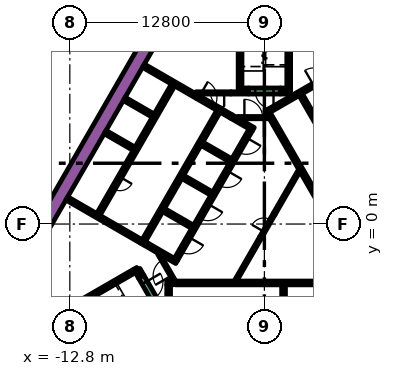
"""IFC4 building model, lengths in metres.
Left out: names, types, materials, properties, quantities, classifications, styles, units other than length and angle.
Written with IfcOpenShell. Run it as: python <this file> out.ifc"""

import sys

from ifc_helpers import new_model, si_unit, direction, frame, frame_2d, origin, place, context, subcontext, project, spatial, polyline, rectangle, outline, extrude, element, fill, save


model = new_model("IFC4")
c1 = context("Model", 3, precision=1e-05, world=origin(), true_north=direction((0.0, 1.0)))
c2 = subcontext(c1, "Body", "Model", "MODEL_VIEW")
j1 = project(units=[si_unit("LENGTHUNIT", "METRE"), si_unit("PLANEANGLEUNIT", "RADIAN")], contexts=[c1])
p1 = place(None, origin())
s1 = spatial("IfcSite", under=j1, at=p1, CompositionType="ELEMENT")
p2 = place(p1, origin())
s2 = spatial("IfcBuilding", under=s1, at=p2, CompositionType="ELEMENT")
p3 = place(p2, frame((0.0, 0.0, 11.4)))
s3 = spatial("IfcBuildingStorey", under=s2, at=p3, CompositionType="ELEMENT", Elevation=11.4)
p4 = place(p3, frame((-15.36, -1.503, 0.0), z_axis=(0.0, 0.0, 1.0), x_axis=(0.50000389221, 0.866023156604, 0.0)))
e1 = element("IfcWall", 1, at=p4, inside=s3, PredefinedType="SOLIDWALL", context=c2, shape_type="SweptSolid", body=[
    extrude(rectangle(XDim=21.0, YDim=0.9, at=frame_2d((10.5, 0.0))), origin(), (0.0, 0.0, 1.0), 4.8),
])
p5 = place(p3, frame((-12.134, -11.883, 0.0), z_axis=(0.0, 0.0, 1.0), x_axis=(-0.500005339912, 0.866022320763, 0.0)))
e2 = element("IfcWall", 2, at=p5, inside=s3, PredefinedType="SOLIDWALL", context=c2, shape_type="SweptSolid", body=[
    extrude(rectangle(XDim=9.488, YDim=0.9, at=frame_2d((4.744, 0.0))), origin(), (0.0, 0.0, 1.0), 4.8),
])
p6 = place(p3, frame((1.6, 8.95, 0.0), z_axis=(0.0, 0.0, 1.0), x_axis=(0.0, 1.0, 0.0)))
e3 = element("IfcWall", 3, at=p6, inside=s3, PredefinedType="SOLIDWALL", context=c2, shape_type="SweptSolid", body=[
    extrude(rectangle(XDim=6.8, YDim=0.25, at=frame_2d((3.4, 0.0))), origin(), (0.0, 0.0, 1.0), 4.8),
])
p7 = place(p3, frame((1.05, 8.825, 0.0), z_axis=(0.0, 0.0, 1.0), x_axis=(1.0, 0.0, 0.0)))
e4 = element("IfcWall", 4, at=p7, inside=s3, PredefinedType="SOLIDWALL", context=c2, shape_type="SweptSolid", body=[
    extrude(rectangle(XDim=0.675, YDim=0.25, at=frame_2d((0.337, 0.0))), origin(), (0.0, 0.0, 1.0), 4.8),
])
p8 = place(p3, frame((-1.6, 8.7, 0.0), z_axis=(0.0, 0.0, 1.0), x_axis=(0.0, 1.0, 0.0)))
e5 = element("IfcWall", 5, at=p8, inside=s3, PredefinedType="SOLIDWALL", context=c2, shape_type="SweptSolid", body=[
    extrude(rectangle(XDim=7.05, YDim=0.25, at=frame_2d((3.525, 0.0))), origin(), (0.0, 0.0, 1.0), 4.8),
])
p9 = place(p3, frame((-1.475, 8.825, 0.0), z_axis=(0.0, 0.0, 1.0), x_axis=(1.0, 0.0, 0.0)))
e6 = element("IfcWall", 6, at=p9, inside=s3, PredefinedType="SOLIDWALL", context=c2, shape_type="SweptSolid", body=[
    extrude(rectangle(XDim=0.425, YDim=0.25, at=frame_2d((0.212, 0.0))), origin(), (0.0, 0.0, 1.0), 4.8),
])
p10 = place(p3, frame((-14.44, -6.49, 0.0), z_axis=(0.0, 0.0, 1.0), x_axis=(0.866022966069, 0.500004222222, 0.0)))
e7 = element("IfcWall", 7, at=p10, inside=s3, PredefinedType="SOLIDWALL", context=c2, shape_type="SweptSolid", body=[
    extrude(rectangle(XDim=6.8, YDim=0.25, at=frame_2d((3.4, 0.0))), origin(), (0.0, 0.0, 1.0), 4.8),
])
p11 = place(p3, frame((-8.168, -3.503, 0.0), z_axis=(0.0, 0.0, 1.0), x_axis=(-0.499952099219, 0.866053057547, 0.0)))
e8 = element("IfcWall", 8, at=p11, inside=s3, PredefinedType="SOLIDWALL", context=c2, shape_type="SweptSolid", body=[
    extrude(rectangle(XDim=0.675, YDim=0.25, at=frame_2d((0.337, 0.0))), origin(), (0.0, 0.0, 1.0), 4.8),
])
p12 = place(p3, frame((-5.845, -3.875, 0.0), z_axis=(0.0, 0.0, 1.0), x_axis=(1.0, 0.0, 0.0)))
e9 = element("IfcWall", 9, at=p12, inside=s3, PredefinedType="SOLIDWALL", context=c2, shape_type="SweptSolid", body=[
    extrude(rectangle(XDim=12.27, YDim=0.25, at=frame_2d((6.135, 0.0))), origin(), (0.0, 0.0, 1.0), 4.8),
])
p13 = place(p3, frame((-6.425, -3.875, 0.0), z_axis=(0.0, 0.0, 1.0), x_axis=(1.0, 0.0, 0.0)))
e10 = element("IfcWall", 10, at=p13, inside=s3, PredefinedType="SOLIDWALL", context=c2, shape_type="SweptSolid", body=[
    extrude(rectangle(XDim=0.428, YDim=0.25, at=frame_2d((0.214, 0.0))), origin(), (0.0, 0.0, 1.0), 4.8),
])
p14 = place(p3, frame((1.26, -4.0, 0.0), z_axis=(0.0, 0.0, 1.0), x_axis=(0.0, -1.0, 0.0)))
e11 = element("IfcWall", 11, at=p14, inside=s3, PredefinedType="SOLIDWALL", context=c2, shape_type="SweptSolid", body=[
    extrude(rectangle(XDim=2.2, YDim=0.25, at=frame_2d((1.1, 0.0))), origin(), (0.0, 0.0, 1.0), 4.8),
])
p15 = place(p3, frame((-6.3, -4.0, 0.0), z_axis=(0.0, 0.0, 1.0), x_axis=(0.0, -1.0, 0.0)))
e12 = element("IfcWall", 12, at=p15, inside=s3, PredefinedType="SOLIDWALL", context=c2, shape_type="SweptSolid", body=[
    extrude(rectangle(XDim=3.154, YDim=0.25, at=frame_2d((1.577, 0.0))), origin(), (0.0, 0.0, 1.0), 4.8),
])
p16 = place(p3, origin())
e13 = element("IfcWall", 13, at=p16, inside=s3, PredefinedType="SOLIDWALL", context=c2, shape_type="SweptSolid", body=[
    extrude(outline(polyline([(6.552, -3.348), (6.677, -3.564), (6.46, -3.689), (4.897, -0.981), (0.332, 6.925), (0.335, 6.925), (0.335, 6.925), (0.335, 6.925), (0.335, 7.075), (0.335, 7.075), (0.335, 7.075), (0.245, 7.075), (0.079, 7.363), (0.035, 7.439), (0.252, 7.564), (0.377, 7.348), (6.552, -3.348)])), origin(), (0.0, 0.0, 1.0), 4.8),
])
p17 = place(p3, frame((0.314, 7.456, 0.0), z_axis=(0.0, 0.0, 1.0), x_axis=(0.866013897511, 0.50001992892, 0.0)))
e14 = element("IfcWall", 14, at=p17, inside=s3, PredefinedType="SOLIDWALL", context=c2, shape_type="SweptSolid", body=[
    extrude(rectangle(XDim=3.268, YDim=0.25, at=frame_2d((1.634, 0.0))), origin(), (0.0, 0.0, 1.0), 4.8),
])
p18 = place(p3, frame((-8.06, -1.311, 0.0), z_axis=(0.0, 0.0, 1.0), x_axis=(0.50000273126, 0.866023826885, 0.0)))
e15 = element("IfcWall", 15, at=p18, inside=s3, PredefinedType="SOLIDWALL", context=c2, shape_type="SweptSolid", body=[
    extrude(rectangle(XDim=10.33, YDim=0.25, at=frame_2d((5.165, 0.0))), origin(), (0.0, 0.0, 1.0), 4.8),
])
p19 = place(p3, frame((-1.819, 6.87, 0.0), z_axis=(0.0, 0.0, 1.0), x_axis=(-0.866294599386, 0.499533449405, 0.0)))
e16 = element("IfcWall", 16, at=p19, inside=s3, PredefinedType="SOLIDWALL", context=c2, shape_type="SweptSolid", body=[
    extrude(rectangle(XDim=0.41, YDim=0.25, at=frame_2d((0.205, 0.0))), origin(), (0.0, 0.0, 1.0), 4.8),
])
p20 = place(p3, frame((-2.849, 7.465, 0.0), z_axis=(0.0, 0.0, 1.0), x_axis=(0.865955664968, -0.500120771724, 0.0)))
e17 = element("IfcWall", 17, at=p20, inside=s3, PredefinedType="SOLIDWALL", context=c2, shape_type="SweptSolid", body=[
    extrude(rectangle(XDim=0.778, YDim=0.25, at=frame_2d((0.389, 0.0))), origin(), (0.0, 0.0, 1.0), 4.8),
])
p21 = place(p3, frame((-0.728, 6.24, 0.0), z_axis=(0.0, 0.0, 1.0), x_axis=(-0.866002680491, 0.500039355833, 0.0)))
e18 = element("IfcWall", 18, at=p21, inside=s3, PredefinedType="SOLIDWALL", context=c2, shape_type="SweptSolid", body=[
    extrude(rectangle(XDim=1.178, YDim=0.25, at=frame_2d((0.589, 0.0))), origin(), (0.0, 0.0, 1.0), 4.8),
])
for number, where, z_axis, x_axis in (
    (19, (-2.204, 4.182, 0.0), (0.0, 0.0, 1.0), (-0.866, 0.5, 0.0)),
    (20, (-5.369, 3.1, 0.0), (0.0, 0.0, 1.0), (0.866, -0.5, 0.0)),
    (21, (-4.724, -0.182, 0.0), (0.0, 0.0, 1.0), (-0.866, 0.5, 0.0)),
):
    element("IfcWall", number, at=place(p3, frame(where, z_axis=z_axis, x_axis=x_axis)), inside=s3, PredefinedType="SOLIDWALL", context=c2, shape_type="SweptSolid", body=[
        extrude(rectangle(XDim=2.2, YDim=0.25, at=frame_2d((1.1, 0.0))), origin(), (0.0, 0.0, 1.0), 4.8),
    ])
e22 = element("IfcWall", 22, at=p16, inside=s3, PredefinedType="SOLIDWALL", context=c2, shape_type="SweptSolid", body=[
    extrude(outline(polyline([(-5.922, -2.257), (-5.922, -2.257), (-5.705, -2.382), (-5.83, -2.598), (-6.829, -2.021), (-6.88, -1.934), (-6.88, -1.934), (-6.93, -1.963), (-7.952, -1.373), (-7.827, -1.156), (-5.922, -2.257)])), origin(), (0.0, 0.0, 1.0), 4.8),
])
p22 = place(p3, frame((-8.106, -1.14, 0.0), z_axis=(0.0, 0.0, 1.0), x_axis=(-0.866000643155, 0.500042884217, 0.0)))
e23 = element("IfcWall", 23, at=p22, inside=s3, PredefinedType="SOLIDWALL", context=c2, shape_type="SweptSolid", body=[
    extrude(rectangle(XDim=5.65, YDim=0.25, at=frame_2d((2.825, 0.0))), origin(), (0.0, 0.0, 1.0), 4.8),
])
e24 = element("IfcWall", 24, at=p16, inside=s3, PredefinedType="SOLIDWALL", context=c2, shape_type="SweptSolid", body=[
    extrude(outline(polyline([(-3.128, 7.481), (-3.259, 7.557), (-3.134, 7.773), (-3.003, 7.698), (-3.128, 7.481)])), origin(), (0.0, 0.0, 1.0), 4.8),
])
for number, where, z_axis, x_axis in (
    (25, (-8.574, 4.95, 0.0), (0.0, 0.0, 1.0), (-0.866, 0.5, 0.0)),
    (26, (-7.314, 7.132, 0.0), (0.0, 0.0, 1.0), (-0.866, 0.5, 0.0)),
):
    element("IfcWall", number, at=place(p3, frame(where, z_axis=z_axis, x_axis=x_axis)), inside=s3, PredefinedType="SOLIDWALL", context=c2, shape_type="SweptSolid", body=[
        extrude(rectangle(XDim=2.2, YDim=0.25, at=frame_2d((1.1, 0.0))), origin(), (0.0, 0.0, 1.0), 4.8),
    ])
p23 = place(p3, frame((-7.959, 10.415, 0.0), z_axis=(0.0, 0.0, 1.0), x_axis=(0.866020958405, -0.500007699544, 0.0)))
e27 = element("IfcWall", 27, at=p23, inside=s3, PredefinedType="SOLIDWALL", context=c2, shape_type="SweptSolid", body=[
    extrude(rectangle(XDim=4.1, YDim=0.25, at=frame_2d((2.05, 0.0))), origin(), (0.0, 0.0, 1.0), 4.8),
])
p24 = place(p3, frame((-8.252, -2.958, 0.0), z_axis=(0.0, 0.0, 1.0), x_axis=(0.500174715838, -0.865924508047, 0.0)))
e28 = element("IfcWall", 28, at=p24, inside=s3, PredefinedType="PARTITIONING", context=c2, shape_type="SweptSolid", body=[
    extrude(rectangle(XDim=0.514, YDim=0.15, at=frame_2d((0.257, 0.0))), origin(), (0.0, 0.0, 1.0), 3.9),
])
p25 = place(p3, frame((-3.997, 8.625, 0.0), z_axis=(0.0, 0.0, 1.0), x_axis=(-1.0, 0.0, 0.0)))
e29 = element("IfcWall", 29, at=p25, inside=s3, PredefinedType="PARTITIONING", context=c2, shape_type="SweptSolid", body=[
    extrude(rectangle(XDim=0.502, YDim=0.15, at=frame_2d((0.251, 0.0))), origin(), (0.0, 0.0, 1.0), 3.9),
])
p26 = place(p3, frame((-2.196, 8.625, 0.0), z_axis=(0.0, 0.0, 1.0), x_axis=(1.0, 0.0, 0.0)))
e30 = element("IfcWall", 30, at=p26, inside=s3, PredefinedType="PARTITIONING", context=c2, shape_type="SweptSolid", body=[
    extrude(rectangle(XDim=1.146, YDim=0.15, at=frame_2d((0.573, 0.0))), origin(), (0.0, 0.0, 1.0), 3.9),
])
for number, where, z_axis, x_axis in (
    (31, (-1.887, -3.718, 0.0), (0.0, 0.0, 1.0), (0.5, 0.866, 0.0)),
    (32, (0.645, 0.667, 0.0), (0.0, 0.0, 1.0), (0.5, 0.866, 0.0)),
):
    element("IfcWall", number, at=place(p3, frame(where, z_axis=z_axis, x_axis=x_axis)), inside=s3, PredefinedType="PARTITIONING", context=c2, shape_type="SweptSolid", body=[
        extrude(rectangle(XDim=3.263, YDim=0.15, at=frame_2d((1.632, 0.0))), origin(), (0.0, 0.0, 1.0), 3.9),
    ])
p27 = place(p3, frame((1.05, 8.625, 0.0), z_axis=(0.0, 0.0, 1.0), x_axis=(1.0, 0.0, 0.0)))
e33 = element("IfcWall", 33, at=p27, inside=s3, PredefinedType="PARTITIONING", context=c2, shape_type="SweptSolid", body=[
    extrude(rectangle(XDim=0.514, YDim=0.15, at=frame_2d((0.257, 0.0))), origin(), (0.0, 0.0, 1.0), 3.9),
])
p28 = place(p3, frame((8.565, -2.185, 0.0), z_axis=(0.0, 0.0, 1.0), x_axis=(-0.499997954832, 0.866026584559, 0.0)))
e34 = element("IfcWall", 34, at=p28, inside=s3, PredefinedType="SOLIDWALL", context=c2, shape_type="SweptSolid", body=[
    extrude(rectangle(XDim=12.35, YDim=0.25, at=frame_2d((6.175, 0.0))), origin(), (0.0, 0.0, 1.0), 4.8),
])
p29 = place(p28, frame((5.725, 0.0, 0.0)))
e35 = element("IfcOpeningElement", 35, at=p29, cuts=e34, PredefinedType="OPENING", context=c2, shape_type="SweptSolid", body=[
    extrude(rectangle(XDim=0.9, YDim=2.1, at=frame_2d((0.45, 1.05))), frame((0.0, 0.135, 0.0), z_axis=(0.0, -1.0, 0.0), x_axis=(1.0, 0.0, 0.0)), (0.0, 0.0, 1.0), 0.27),
])
p30 = place(p3, frame((-6.008, 9.144, 0.0), z_axis=(0.0, 0.0, 1.0), x_axis=(-0.500006956611, -0.866021387346, 0.0)))
e36 = element("IfcWall", 36, at=p30, inside=s3, PredefinedType="SOLIDWALL", context=c2, shape_type="SweptSolid", body=[
    extrude(rectangle(XDim=9.83, YDim=0.25, at=frame_2d((4.915, 0.0))), origin(), (0.0, 0.0, 1.0), 4.8),
])
p31 = place(p30, frame((6.985, 0.0, 0.0)))
e37 = element("IfcOpeningElement", 37, at=p31, cuts=e36, PredefinedType="OPENING", context=c2, shape_type="SweptSolid", body=[
    extrude(rectangle(XDim=0.9, YDim=2.1, at=frame_2d((0.45, 1.05))), frame((0.0, 0.135, 0.0), z_axis=(0.0, -1.0, 0.0), x_axis=(1.0, 0.0, 0.0)), (0.0, 0.0, 1.0), 0.27),
])
p32 = place(p3, frame((-0.898, 6.194, 0.0), z_axis=(0.0, 0.0, 1.0), x_axis=(-0.499996202215, -0.866027596426, 0.0)))
e38 = element("IfcWall", 38, at=p32, inside=s3, PredefinedType="SOLIDWALL", context=c2, shape_type="SweptSolid", body=[
    extrude(rectangle(XDim=9.83, YDim=0.25, at=frame_2d((4.915, 0.0))), origin(), (0.0, 0.0, 1.0), 4.8),
])
p33 = place(p32, frame((0.585, 0.0, 0.0)))
e39 = element("IfcOpeningElement", 39, at=p33, cuts=e38, PredefinedType="OPENING", context=c2, shape_type="SweptSolid", body=[
    extrude(rectangle(XDim=1.1, YDim=2.1, at=frame_2d((0.55, 1.05))), frame((0.0, 0.135, 0.0), z_axis=(0.0, -1.0, 0.0), x_axis=(1.0, 0.0, 0.0)), (0.0, 0.0, 1.0), 0.27),
])
p34 = place(p32, frame((3.105, 0.0, 0.0)))
e40 = element("IfcOpeningElement", 40, at=p34, cuts=e38, PredefinedType="OPENING", context=c2, shape_type="SweptSolid", body=[
    extrude(rectangle(XDim=1.1, YDim=2.1, at=frame_2d((0.55, 1.05))), frame((0.0, 0.135, 0.0), z_axis=(0.0, -1.0, 0.0), x_axis=(1.0, 0.0, 0.0)), (0.0, 0.0, 1.0), 0.27),
])
p35 = place(p32, frame((5.625, 0.0, 0.0)))
e41 = element("IfcOpeningElement", 41, at=p35, cuts=e38, PredefinedType="OPENING", context=c2, shape_type="SweptSolid", body=[
    extrude(rectangle(XDim=1.1, YDim=2.1, at=frame_2d((0.55, 1.05))), frame((0.0, 0.135, 0.0), z_axis=(0.0, -1.0, 0.0), x_axis=(1.0, 0.0, 0.0)), (0.0, 0.0, 1.0), 0.27),
])
p36 = place(p32, frame((8.145, 0.0, 0.0)))
e42 = element("IfcOpeningElement", 42, at=p36, cuts=e38, PredefinedType="OPENING", context=c2, shape_type="SweptSolid", body=[
    extrude(rectangle(XDim=1.1, YDim=2.1, at=frame_2d((0.55, 1.05))), frame((0.0, 0.135, 0.0), z_axis=(0.0, -1.0, 0.0), x_axis=(1.0, 0.0, 0.0)), (0.0, 0.0, 1.0), 0.27),
])
p37 = place(p3, frame((1.05, 8.75, 0.0), z_axis=(0.0, 0.0, 1.0), x_axis=(-1.0, 0.0, 0.0)))
e43 = element("IfcWall", 43, at=p37, inside=s3, PredefinedType="SOLIDWALL", context=c2, shape_type="SweptSolid", body=[
    extrude(rectangle(XDim=2.1, YDim=0.4, at=frame_2d((1.05, 0.0))), origin(), (0.0, 0.0, 1.0), 4.8),
])
p38 = place(p37, frame((0.45, 0.0, 0.0)))
e44 = element("IfcOpeningElement", 44, at=p38, cuts=e43, PredefinedType="OPENING", context=c2, shape_type="SweptSolid", body=[
    extrude(rectangle(XDim=1.2, YDim=2.1, at=frame_2d((0.6, 1.05))), frame((0.0, 0.21, 0.0), z_axis=(0.0, -1.0, 0.0), x_axis=(1.0, 0.0, 0.0)), (0.0, 0.0, 1.0), 0.42),
])
p39 = place(p3, frame((-2.196, 8.625, 0.0), z_axis=(0.0, 0.0, 1.0), x_axis=(-1.0, 0.0, 0.0)))
e45 = element("IfcWall", 45, at=p39, inside=s3, PredefinedType="PARTITIONING", context=c2, shape_type="SweptSolid", body=[
    extrude(rectangle(XDim=1.8, YDim=0.15, at=frame_2d((0.9, 0.0))), origin(), (0.0, 0.0, 1.0), 3.9),
])
p40 = place(p39, frame((0.45, 0.0, 0.0)))
e46 = element("IfcOpeningElement", 46, at=p40, cuts=e45, PredefinedType="OPENING", context=c2, shape_type="SweptSolid", body=[
    extrude(rectangle(XDim=0.9, YDim=2.1, at=frame_2d((0.45, 1.05))), frame((0.0, 0.085, 0.0), z_axis=(0.0, -1.0, 0.0), x_axis=(1.0, 0.0, 0.0)), (0.0, 0.0, 1.0), 0.17),
])
p41 = place(p3, frame((-8.103, -3.466, 0.0), z_axis=(0.0, 0.0, 1.0), x_axis=(0.500078061341, -0.865980330357, 0.0)))
e47 = element("IfcWall", 47, at=p41, inside=s3, PredefinedType="SOLIDWALL", context=c2, shape_type="SweptSolid", body=[
    extrude(rectangle(XDim=2.1, YDim=0.4, at=frame_2d((1.05, 0.0))), origin(), (0.0, 0.0, 1.0), 4.8),
])
p42 = place(p41, frame((0.45, 0.0, 0.0)))
e48 = element("IfcOpeningElement", 48, at=p42, cuts=e47, PredefinedType="OPENING", context=c2, shape_type="SweptSolid", body=[
    extrude(rectangle(XDim=1.2, YDim=2.1, at=frame_2d((0.6, 1.05))), frame((0.0, 0.21, 0.0), z_axis=(0.0, -1.0, 0.0), x_axis=(1.0, 0.0, 0.0)), (0.0, 0.0, 1.0), 0.42),
])
p43 = place(p3, frame((-1.765, 7.0, 0.0), z_axis=(0.0, 0.0, 1.0), x_axis=(1.0, 0.0, 0.0)))
e49 = element("IfcWall", 49, at=p43, inside=s3, PredefinedType="PARTITIONING", context=c2, shape_type="SweptSolid", body=[
    extrude(rectangle(XDim=2.1, YDim=0.15, at=frame_2d((1.05, 0.0))), origin(), (0.0, 0.0, 1.0), 3.9),
])
p44 = place(p43, frame((0.45, 0.0, 0.0)))
e50 = element("IfcOpeningElement", 50, at=p44, cuts=e49, PredefinedType="OPENING", context=c2, shape_type="SweptSolid", body=[
    extrude(rectangle(XDim=1.2, YDim=2.1, at=frame_2d((0.6, 1.05))), frame((0.0, 0.085, 0.0), z_axis=(0.0, -1.0, 0.0), x_axis=(1.0, 0.0, 0.0)), (0.0, 0.0, 1.0), 0.17),
])
p45 = place(p3, frame((-5.895, -3.79, 0.0), z_axis=(0.0, 0.0, 1.0), x_axis=(-0.49994051562, 0.866059744384, 0.0)))
e51 = element("IfcWall", 51, at=p45, inside=s3, PredefinedType="PARTITIONING", context=c2, shape_type="SweptSolid", body=[
    extrude(rectangle(XDim=2.1, YDim=0.15, at=frame_2d((1.05, 0.0))), origin(), (0.0, 0.0, 1.0), 3.9),
])
p46 = place(p45, frame((0.45, 0.0, 0.0)))
e52 = element("IfcOpeningElement", 52, at=p46, cuts=e51, PredefinedType="OPENING", context=c2, shape_type="SweptSolid", body=[
    extrude(rectangle(XDim=1.2, YDim=2.1, at=frame_2d((0.6, 1.05))), frame((0.0, 0.085, 0.0), z_axis=(0.0, -1.0, 0.0), x_axis=(1.0, 0.0, 0.0)), (0.0, 0.0, 1.0), 0.17),
])
p47 = place(p3, frame((3.183, 9.02, 0.0), z_axis=(0.0, 0.0, 1.0), x_axis=(0.866034573852, 0.49998411664, 0.0)))
e53 = element("IfcWall", 53, at=p47, inside=s3, PredefinedType="PARTITIONING", context=c2, shape_type="SweptSolid", body=[
    extrude(rectangle(XDim=1.4, YDim=0.09, at=frame_2d((0.7, 0.0))), origin(), (0.0, 0.0, 1.0), 3.9),
])
p48 = place(p47, frame((0.1, 0.0, 0.0)))
e54 = element("IfcOpeningElement", 54, at=p48, cuts=e53, PredefinedType="OPENING", context=c2, shape_type="SweptSolid", body=[
    extrude(rectangle(XDim=1.2, YDim=2.1, at=frame_2d((0.6, 1.05))), frame((0.0, 0.055, 0.0), z_axis=(0.0, -1.0, 0.0), x_axis=(1.0, 0.0, 0.0)), (0.0, 0.0, 1.0), 0.11),
])
p49 = place(p3, frame((-4.409, 8.365, 0.0), z_axis=(0.0, 0.0, 1.0), x_axis=(0.866034573852, -0.49998411664, 0.0)))
e55 = element("IfcWall", 55, at=p49, inside=s3, PredefinedType="SOLIDWALL", context=c2, shape_type="SweptSolid", body=[
    extrude(rectangle(XDim=1.4, YDim=0.25, at=frame_2d((0.7, 0.0))), origin(), (0.0, 0.0, 1.0), 4.8),
])
p50 = place(p49, frame((0.1, 0.0, 0.0)))
e56 = element("IfcOpeningElement", 56, at=p50, cuts=e55, PredefinedType="OPENING", context=c2, shape_type="SweptSolid", body=[
    extrude(rectangle(XDim=1.2, YDim=2.1, at=frame_2d((0.6, 1.05))), frame((0.0, 0.135, 0.0), z_axis=(0.0, -1.0, 0.0), x_axis=(1.0, 0.0, 0.0)), (0.0, 0.0, 1.0), 0.27),
])
p51 = place(p3, frame((-0.255, -0.892, 0.0), z_axis=(0.0, 0.0, 1.0), x_axis=(0.500062916607, 0.865989075817, 0.0)))
e57 = element("IfcWall", 57, at=p51, inside=s3, PredefinedType="PARTITIONING", context=c2, shape_type="SweptSolid", body=[
    extrude(rectangle(XDim=1.8, YDim=0.15, at=frame_2d((0.9, 0.0))), origin(), (0.0, 0.0, 1.0), 3.9),
])
p52 = place(p51, frame((0.45, 0.0, 0.0)))
e58 = element("IfcOpeningElement", 58, at=p52, cuts=e57, PredefinedType="OPENING", context=c2, shape_type="SweptSolid", body=[
    extrude(rectangle(XDim=0.9, YDim=2.1, at=frame_2d((0.45, 1.05))), frame((0.0, 0.085, 0.0), z_axis=(0.0, -1.0, 0.0), x_axis=(1.0, 0.0, 0.0)), (0.0, 0.0, 1.0), 0.17),
])
p53 = place(p31, origin())
e59 = element("IfcDoor", 59, at=p53, inside=s3, OperationType="SINGLE_SWING_LEFT", PredefinedType="DOOR", context=c2, shape_type="SweptSolid", body=[
    extrude(rectangle(XDim=0.9, YDim=2.1, at=frame_2d((0.45, 1.05))), frame((0.0, 0.025, 0.0), z_axis=(0.0, -1.0, 0.0), x_axis=(1.0, 0.0, 0.0)), (0.0, 0.0, 1.0), 0.05),
])
fill(e37, e59)
p54 = place(p33, origin())
e60 = element("IfcDoor", 60, at=p54, inside=s3, OperationType="DOUBLE_DOOR_SLIDING", PredefinedType="DOOR", context=c2, shape_type="SweptSolid", body=[
    extrude(rectangle(XDim=1.1, YDim=2.1, at=frame_2d((0.55, 1.05))), frame((0.0, 0.025, 0.0), z_axis=(0.0, -1.0, 0.0), x_axis=(1.0, 0.0, 0.0)), (0.0, 0.0, 1.0), 0.05),
])
fill(e39, e60)
p55 = place(p34, origin())
e61 = element("IfcDoor", 61, at=p55, inside=s3, OperationType="DOUBLE_DOOR_SLIDING", PredefinedType="DOOR", context=c2, shape_type="SweptSolid", body=[
    extrude(rectangle(XDim=1.1, YDim=2.1, at=frame_2d((0.55, 1.05))), frame((0.0, 0.025, 0.0), z_axis=(0.0, -1.0, 0.0), x_axis=(1.0, 0.0, 0.0)), (0.0, 0.0, 1.0), 0.05),
])
fill(e40, e61)
p56 = place(p35, origin())
e62 = element("IfcDoor", 62, at=p56, inside=s3, OperationType="DOUBLE_DOOR_SLIDING", PredefinedType="DOOR", context=c2, shape_type="SweptSolid", body=[
    extrude(rectangle(XDim=1.1, YDim=2.1, at=frame_2d((0.55, 1.05))), frame((0.0, 0.025, 0.0), z_axis=(0.0, -1.0, 0.0), x_axis=(1.0, 0.0, 0.0)), (0.0, 0.0, 1.0), 0.05),
])
fill(e41, e62)
p57 = place(p36, origin())
e63 = element("IfcDoor", 63, at=p57, inside=s3, OperationType="DOUBLE_DOOR_SLIDING", PredefinedType="DOOR", context=c2, shape_type="SweptSolid", body=[
    extrude(rectangle(XDim=1.1, YDim=2.1, at=frame_2d((0.55, 1.05))), frame((0.0, 0.025, 0.0), z_axis=(0.0, -1.0, 0.0), x_axis=(1.0, 0.0, 0.0)), (0.0, 0.0, 1.0), 0.05),
])
fill(e42, e63)
p58 = place(p38, origin())
e64 = element("IfcDoor", 64, at=p58, inside=s3, OperationType="SINGLE_SWING_LEFT", PredefinedType="DOOR", context=c2, shape_type="SweptSolid", body=[
    extrude(rectangle(XDim=1.2, YDim=2.1, at=frame_2d((0.6, 1.05))), frame((0.0, 0.025, 0.0), z_axis=(0.0, -1.0, 0.0), x_axis=(1.0, 0.0, 0.0)), (0.0, 0.0, 1.0), 0.05),
])
fill(e44, e64)
p59 = place(p40, origin())
e65 = element("IfcDoor", 65, at=p59, inside=s3, OperationType="SINGLE_SWING_LEFT", PredefinedType="DOOR", context=c2, shape_type="SweptSolid", body=[
    extrude(rectangle(XDim=0.9, YDim=2.1, at=frame_2d((0.45, 1.05))), frame((0.0, 0.025, 0.0), z_axis=(0.0, -1.0, 0.0), x_axis=(1.0, 0.0, 0.0)), (0.0, 0.0, 1.0), 0.05),
])
fill(e46, e65)
p60 = place(p42, origin())
e66 = element("IfcDoor", 66, at=p60, inside=s3, OperationType="SINGLE_SWING_LEFT", PredefinedType="DOOR", context=c2, shape_type="SweptSolid", body=[
    extrude(rectangle(XDim=1.2, YDim=2.1, at=frame_2d((0.6, 1.05))), frame((0.0, 0.025, 0.0), z_axis=(0.0, -1.0, 0.0), x_axis=(1.0, 0.0, 0.0)), (0.0, 0.0, 1.0), 0.05),
])
fill(e48, e66)
p61 = place(p44, origin())
e67 = element("IfcDoor", 67, at=p61, inside=s3, OperationType="SINGLE_SWING_LEFT", PredefinedType="DOOR", context=c2, shape_type="SweptSolid", body=[
    extrude(rectangle(XDim=1.2, YDim=2.1, at=frame_2d((0.6, 1.05))), frame((0.0, 0.025, 0.0), z_axis=(0.0, -1.0, 0.0), x_axis=(1.0, 0.0, 0.0)), (0.0, 0.0, 1.0), 0.05),
])
fill(e50, e67)
p62 = place(p46, origin())
e68 = element("IfcDoor", 68, at=p62, inside=s3, OperationType="SINGLE_SWING_LEFT", PredefinedType="DOOR", context=c2, shape_type="SweptSolid", body=[
    extrude(rectangle(XDim=1.2, YDim=2.1, at=frame_2d((0.6, 1.05))), frame((0.0, 0.025, 0.0), z_axis=(0.0, -1.0, 0.0), x_axis=(1.0, 0.0, 0.0)), (0.0, 0.0, 1.0), 0.05),
])
fill(e52, e68)
p63 = place(p50, origin())
e69 = element("IfcDoor", 69, at=p63, inside=s3, OperationType="SINGLE_SWING_LEFT", PredefinedType="DOOR", context=c2, shape_type="SweptSolid", body=[
    extrude(rectangle(XDim=1.2, YDim=2.1, at=frame_2d((0.6, 1.05))), frame((0.0, 0.025, 0.0), z_axis=(0.0, -1.0, 0.0), x_axis=(1.0, 0.0, 0.0)), (0.0, 0.0, 1.0), 0.05),
])
fill(e56, e69)
p64 = place(p52, origin())
e70 = element("IfcDoor", 70, at=p64, inside=s3, OperationType="SINGLE_SWING_LEFT", PredefinedType="DOOR", context=c2, shape_type="SweptSolid", body=[
    extrude(rectangle(XDim=0.9, YDim=2.1, at=frame_2d((0.45, 1.05))), frame((0.0, 0.025, 0.0), z_axis=(0.0, -1.0, 0.0), x_axis=(1.0, 0.0, 0.0)), (0.0, 0.0, 1.0), 0.05),
])
fill(e58, e70)
save(model, sys.argv[1])
